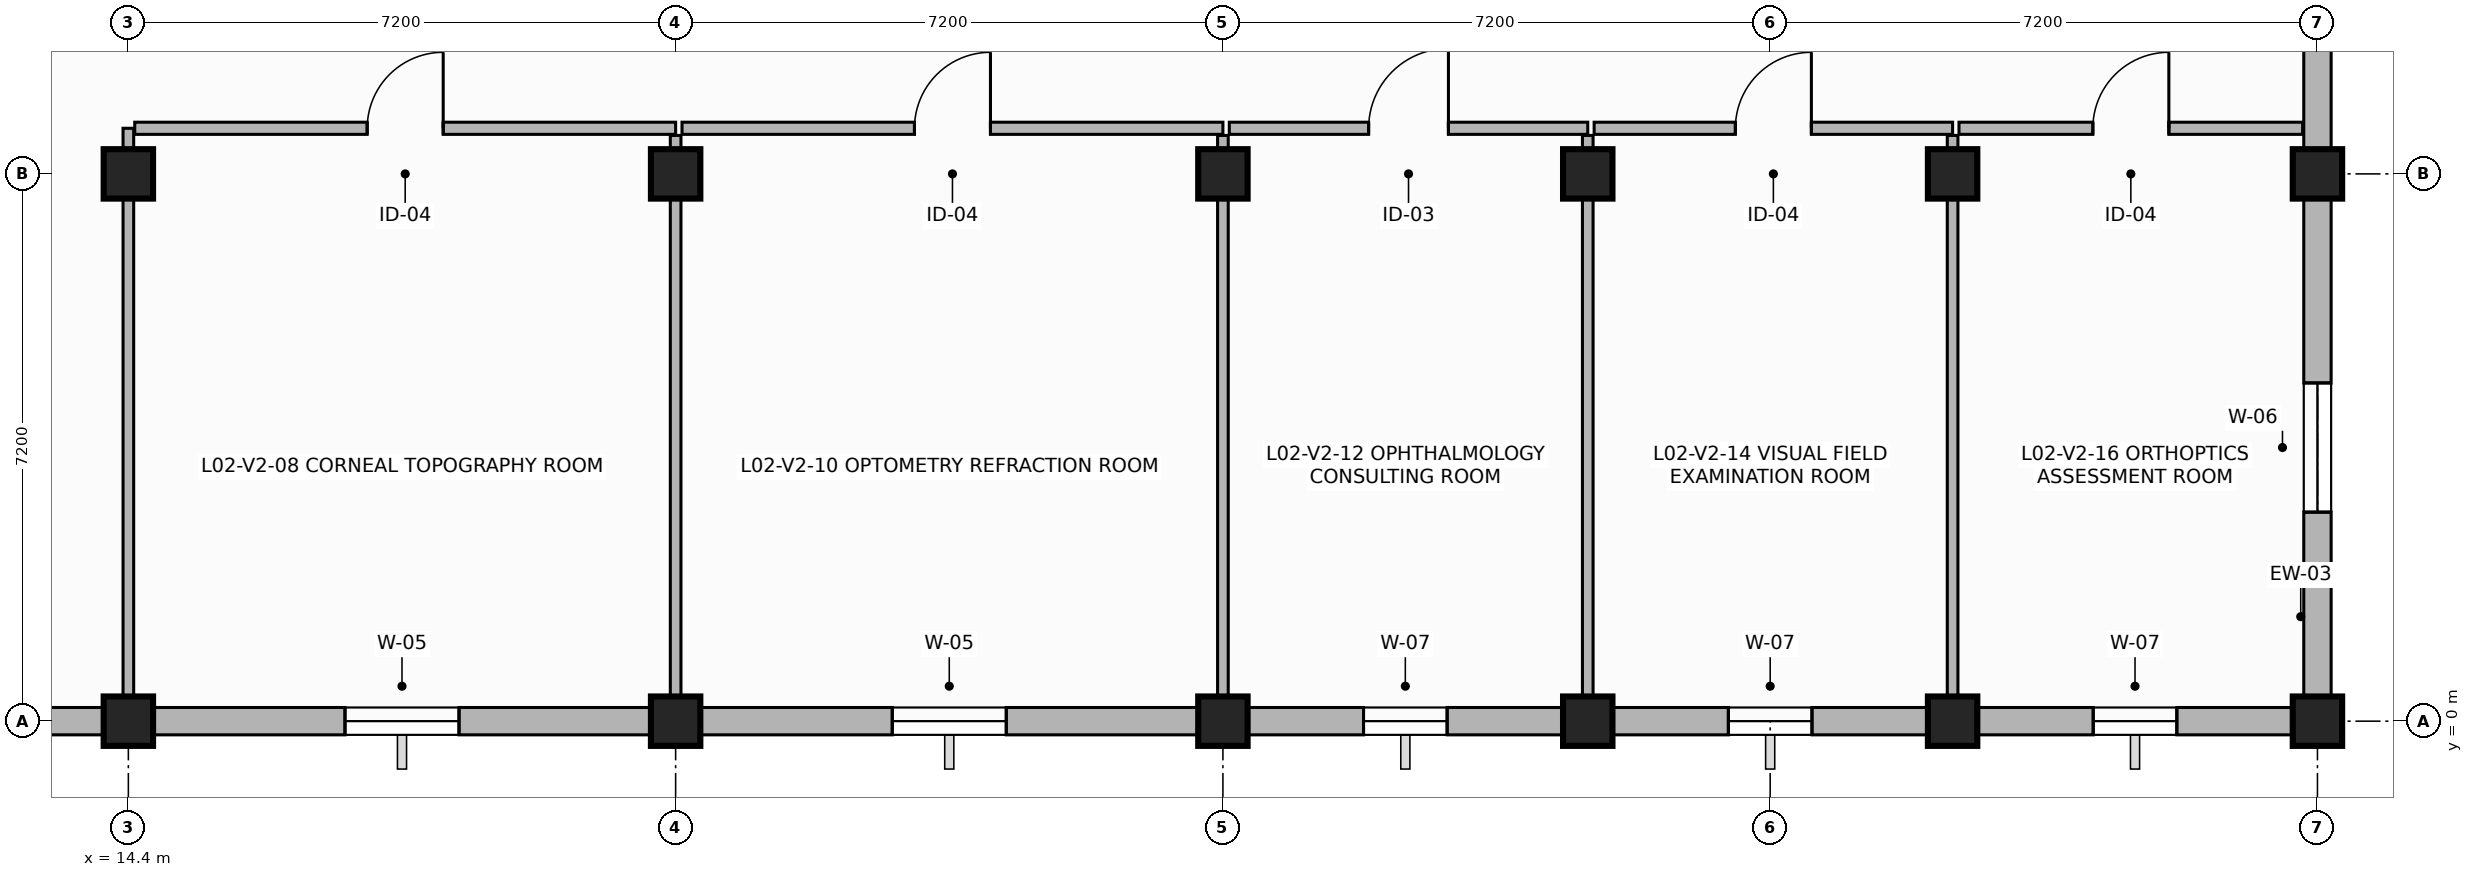
"""IFC4 building model, lengths in metres.
Left out: names, types, materials, properties, quantities, classifications, styles, units other than length and angle.
Written with IfcOpenShell. Run it as: python <this file> out.ifc"""

import sys

from ifc_helpers import new_model, si_unit, direction, frame, frame_2d, origin, origin_2d, place, context, subcontext, project, spatial, rectangle, extrude, element, fill, save


model = new_model("IFC4")
c1 = context("Model", 3, precision=1e-05, world=origin(), true_north=direction((0.0, 1.0)))
c2 = subcontext(c1, "Body", "Model", "MODEL_VIEW")
j1 = project(units=[si_unit("LENGTHUNIT", "METRE"), si_unit("PLANEANGLEUNIT", "RADIAN")], contexts=[c1])
p1 = place(None, origin())
s1 = spatial("IfcSite", under=j1, at=p1, CompositionType="ELEMENT")
p2 = place(p1, origin())
s2 = spatial("IfcBuilding", under=s1, at=p2, CompositionType="ELEMENT")
p3 = place(p2, frame((0.0, 0.0, 8.4)))
s3 = spatial("IfcBuildingStorey", under=s2, at=p3, CompositionType="ELEMENT", Elevation=8.4)
for number, where, z_axis, x_axis in (
    (1, (14.4, 0.0, 0.0), (0.0, 0.0, 1.0), (1.0, 0.0, 0.0)),
    (2, (14.4, 7.2, 0.0), (0.0, 0.0, 1.0), (1.0, 0.0, 0.0)),
    (3, (21.6, 0.0, 0.0), (0.0, 0.0, 1.0), (1.0, 0.0, 0.0)),
    (4, (21.6, 7.2, 0.0), (0.0, 0.0, 1.0), (1.0, 0.0, 0.0)),
    (5, (28.8, 0.0, 0.0), (0.0, 0.0, 1.0), (1.0, 0.0, 0.0)),
    (6, (28.8, 7.2, 0.0), (0.0, 0.0, 1.0), (1.0, 0.0, 0.0)),
    (7, (33.6, 0.0, 0.0), (0.0, 0.0, 1.0), (1.0, 0.0, 0.0)),
    (8, (33.6, 7.2, 0.0), (0.0, 0.0, 1.0), (1.0, 0.0, 0.0)),
    (9, (38.4, 0.0, 0.0), (0.0, 0.0, 1.0), (1.0, 0.0, 0.0)),
    (10, (38.4, 7.2, 0.0), (0.0, 0.0, 1.0), (1.0, 0.0, 0.0)),
    (11, (43.2, 0.0, 0.0), (0.0, 0.0, 1.0), (1.0, 0.0, 0.0)),
    (12, (43.2, 7.2, 0.0), (0.0, 0.0, 1.0), (1.0, 0.0, 0.0)),
):
    element("IfcColumn", number, at=place(p3, frame(where, z_axis=z_axis, x_axis=x_axis)), inside=s3, PredefinedType="COLUMN", context=c2, shape_type="SweptSolid", body=[
        extrude(rectangle(XDim=0.65, YDim=0.65, at=origin_2d()), origin(), (0.0, 0.0, 1.0), 3.62),
    ])
p4 = place(p3, frame((7.2, 0.0, 0.0), z_axis=(0.0, 0.0, 1.0), x_axis=(1.0, 0.0, 0.0)))
e13 = element("IfcWall", 13, at=p4, inside=s3, PredefinedType="SOLIDWALL", context=c2, shape_type="SweptSolid", body=[
    extrude(rectangle(XDim=7.2, YDim=0.36, at=frame_2d((3.6, 0.0))), origin(), (0.0, 0.0, 1.0), 3.0),
])
p5 = place(p4, frame((2.85, 0.0, 0.85)))
e14 = element("IfcOpeningElement", 14, at=p5, cuts=e13, PredefinedType="OPENING", context=c2, shape_type="SweptSolid", body=[
    extrude(rectangle(XDim=1.5, YDim=1.9, at=frame_2d((0.75, 0.95))), frame((0.0, 0.19, 0.0), z_axis=(0.0, -1.0, 0.0), x_axis=(1.0, 0.0, 0.0)), (0.0, 0.0, 1.0), 0.38),
])
p6 = place(p3, frame((14.4, 0.0, 0.0), z_axis=(0.0, 0.0, 1.0), x_axis=(1.0, 0.0, 0.0)))
e15 = element("IfcWall", 15, at=p6, inside=s3, PredefinedType="SOLIDWALL", context=c2, shape_type="SweptSolid", body=[
    extrude(rectangle(XDim=7.2, YDim=0.36, at=frame_2d((3.6, 0.0))), origin(), (0.0, 0.0, 1.0), 3.0),
])
p7 = place(p6, frame((2.85, 0.0, 0.85)))
e16 = element("IfcOpeningElement", 16, at=p7, cuts=e15, PredefinedType="OPENING", context=c2, shape_type="SweptSolid", body=[
    extrude(rectangle(XDim=1.5, YDim=1.9, at=frame_2d((0.75, 0.95))), frame((0.0, 0.19, 0.0), z_axis=(0.0, -1.0, 0.0), x_axis=(1.0, 0.0, 0.0)), (0.0, 0.0, 1.0), 0.38),
])
p8 = place(p3, frame((21.6, 0.0, 0.0), z_axis=(0.0, 0.0, 1.0), x_axis=(1.0, 0.0, 0.0)))
e17 = element("IfcWall", 17, at=p8, inside=s3, PredefinedType="SOLIDWALL", context=c2, shape_type="SweptSolid", body=[
    extrude(rectangle(XDim=7.2, YDim=0.36, at=frame_2d((3.6, 0.0))), origin(), (0.0, 0.0, 1.0), 3.0),
])
p9 = place(p8, frame((2.85, 0.0, 0.85)))
e18 = element("IfcOpeningElement", 18, at=p9, cuts=e17, PredefinedType="OPENING", context=c2, shape_type="SweptSolid", body=[
    extrude(rectangle(XDim=1.5, YDim=1.9, at=frame_2d((0.75, 0.95))), frame((0.0, 0.19, 0.0), z_axis=(0.0, -1.0, 0.0), x_axis=(1.0, 0.0, 0.0)), (0.0, 0.0, 1.0), 0.38),
])
p10 = place(p3, frame((28.8, 0.0, 0.0), z_axis=(0.0, 0.0, 1.0), x_axis=(1.0, 0.0, 0.0)))
e19 = element("IfcWall", 19, at=p10, inside=s3, PredefinedType="SOLIDWALL", context=c2, shape_type="SweptSolid", body=[
    extrude(rectangle(XDim=4.8, YDim=0.36, at=frame_2d((2.4, 0.0))), origin(), (0.0, 0.0, 1.0), 3.0),
])
p11 = place(p10, frame((1.85, 0.0, 0.85)))
e20 = element("IfcOpeningElement", 20, at=p11, cuts=e19, PredefinedType="OPENING", context=c2, shape_type="SweptSolid", body=[
    extrude(rectangle(XDim=1.1, YDim=1.85, at=frame_2d((0.55, 0.925))), frame((0.0, 0.19, 0.0), z_axis=(0.0, -1.0, 0.0), x_axis=(1.0, 0.0, 0.0)), (0.0, 0.0, 1.0), 0.38),
])
p12 = place(p3, frame((33.6, 0.0, 0.0), z_axis=(0.0, 0.0, 1.0), x_axis=(1.0, 0.0, 0.0)))
e21 = element("IfcWall", 21, at=p12, inside=s3, PredefinedType="SOLIDWALL", context=c2, shape_type="SweptSolid", body=[
    extrude(rectangle(XDim=4.8, YDim=0.36, at=frame_2d((2.4, 0.0))), origin(), (0.0, 0.0, 1.0), 3.0),
])
p13 = place(p12, frame((1.85, 0.0, 0.85)))
e22 = element("IfcOpeningElement", 22, at=p13, cuts=e21, PredefinedType="OPENING", context=c2, shape_type="SweptSolid", body=[
    extrude(rectangle(XDim=1.1, YDim=1.85, at=frame_2d((0.55, 0.925))), frame((0.0, 0.19, 0.0), z_axis=(0.0, -1.0, 0.0), x_axis=(1.0, 0.0, 0.0)), (0.0, 0.0, 1.0), 0.38),
])
p14 = place(p3, frame((38.4, 0.0, 0.0), z_axis=(0.0, 0.0, 1.0), x_axis=(1.0, 0.0, 0.0)))
e23 = element("IfcWall", 23, at=p14, inside=s3, PredefinedType="SOLIDWALL", context=c2, shape_type="SweptSolid", body=[
    extrude(rectangle(XDim=4.8, YDim=0.36, at=frame_2d((2.4, 0.0))), origin(), (0.0, 0.0, 1.0), 3.0),
])
p15 = place(p14, frame((1.85, 0.0, 0.85)))
e24 = element("IfcOpeningElement", 24, at=p15, cuts=e23, PredefinedType="OPENING", context=c2, shape_type="SweptSolid", body=[
    extrude(rectangle(XDim=1.1, YDim=1.85, at=frame_2d((0.55, 0.925))), frame((0.0, 0.19, 0.0), z_axis=(0.0, -1.0, 0.0), x_axis=(1.0, 0.0, 0.0)), (0.0, 0.0, 1.0), 0.38),
])
p16 = place(p3, frame((43.2, 0.0, 0.0), z_axis=(0.0, 0.0, 1.0), x_axis=(0.0, 1.0, 0.0)))
e25 = element("IfcWall", 25, at=p16, inside=s3, PredefinedType="SOLIDWALL", context=c2, shape_type="SweptSolid", body=[
    extrude(rectangle(XDim=7.2, YDim=0.36, at=frame_2d((3.6, 0.0))), origin(), (0.0, 0.0, 1.0), 3.0),
])
p17 = place(p16, frame((2.75, 0.0, 0.85)))
e26 = element("IfcOpeningElement", 26, at=p17, cuts=e25, PredefinedType="OPENING", context=c2, shape_type="SweptSolid", body=[
    extrude(rectangle(XDim=1.7, YDim=1.9, at=frame_2d((0.85, 0.95))), frame((0.0, 0.19, 0.0), z_axis=(0.0, -1.0, 0.0), x_axis=(1.0, 0.0, 0.0)), (0.0, 0.0, 1.0), 0.38),
])
p18 = place(p3, frame((43.2, 7.2, 0.0), z_axis=(0.0, 0.0, 1.0), x_axis=(0.0, 1.0, 0.0)))
e27 = element("IfcWall", 27, at=p18, inside=s3, PredefinedType="SOLIDWALL", context=c2, shape_type="SweptSolid", body=[
    extrude(rectangle(XDim=7.2, YDim=0.36, at=frame_2d((3.6, 0.0))), origin(), (0.0, 0.0, 1.0), 3.0),
])
p19 = place(p18, frame((4.35, 0.0, 0.85)))
e28 = element("IfcOpeningElement", 28, at=p19, cuts=e27, PredefinedType="OPENING", context=c2, shape_type="SweptSolid", body=[
    extrude(rectangle(XDim=1.7, YDim=1.9, at=frame_2d((0.85, 0.95))), frame((0.0, 0.19, 0.0), z_axis=(0.0, -1.0, 0.0), x_axis=(1.0, 0.0, 0.0)), (0.0, 0.0, 1.0), 0.38),
])
p20 = place(p3, frame((14.4, 0.195, 0.0), z_axis=(0.0, 0.0, 1.0), x_axis=(0.0, 1.0, 0.0)))
e29 = element("IfcWall", 29, at=p20, inside=s3, PredefinedType="PARTITIONING", context=c2, shape_type="SweptSolid", body=[
    extrude(rectangle(XDim=7.605, YDim=0.14, at=frame_2d((3.802, 0.0))), origin(), (0.0, 0.0, 1.0), 2.98),
])
p21 = place(p3, frame((14.484, 7.8, 0.0), z_axis=(0.0, 0.0, 1.0), x_axis=(1.0, 0.0, 0.0)))
e30 = element("IfcWall", 30, at=p21, inside=s3, PredefinedType="PARTITIONING", context=c2, shape_type="SweptSolid", body=[
    extrude(rectangle(XDim=7.116, YDim=0.16, at=frame_2d((3.558, 0.0))), origin(), (0.0, 0.0, 1.0), 2.98),
])
p22 = place(p21, frame((3.058, 0.0, 0.0)))
e31 = element("IfcOpeningElement", 31, at=p22, cuts=e30, PredefinedType="OPENING", context=c2, shape_type="SweptSolid", body=[
    extrude(rectangle(XDim=1.0, YDim=2.15, at=frame_2d((0.5, 1.075))), frame((0.0, 0.09, 0.0), z_axis=(0.0, -1.0, 0.0), x_axis=(1.0, 0.0, 0.0)), (0.0, 0.0, 1.0), 0.18),
])
p23 = place(p3, frame((21.6, 7.706, 0.0), z_axis=(0.0, 0.0, 1.0), x_axis=(0.0, -1.0, 0.0)))
e32 = element("IfcWall", 32, at=p23, inside=s3, PredefinedType="PARTITIONING", context=c2, shape_type="SweptSolid", body=[
    extrude(rectangle(XDim=7.511, YDim=0.14, at=frame_2d((3.755, 0.0))), origin(), (0.0, 0.0, 1.0), 2.98),
])
p24 = place(p3, frame((21.684, 7.8, 0.0), z_axis=(0.0, 0.0, 1.0), x_axis=(1.0, 0.0, 0.0)))
e33 = element("IfcWall", 33, at=p24, inside=s3, PredefinedType="PARTITIONING", context=c2, shape_type="SweptSolid", body=[
    extrude(rectangle(XDim=7.116, YDim=0.16, at=frame_2d((3.558, 0.0))), origin(), (0.0, 0.0, 1.0), 2.98),
])
p25 = place(p24, frame((3.058, 0.0, 0.0)))
e34 = element("IfcOpeningElement", 34, at=p25, cuts=e33, PredefinedType="OPENING", context=c2, shape_type="SweptSolid", body=[
    extrude(rectangle(XDim=1.0, YDim=2.15, at=frame_2d((0.5, 1.075))), frame((0.0, 0.09, 0.0), z_axis=(0.0, -1.0, 0.0), x_axis=(1.0, 0.0, 0.0)), (0.0, 0.0, 1.0), 0.18),
])
p26 = place(p3, frame((28.8, 7.706, 0.0), z_axis=(0.0, 0.0, 1.0), x_axis=(0.0, -1.0, 0.0)))
e35 = element("IfcWall", 35, at=p26, inside=s3, PredefinedType="PARTITIONING", context=c2, shape_type="SweptSolid", body=[
    extrude(rectangle(XDim=7.511, YDim=0.14, at=frame_2d((3.755, 0.0))), origin(), (0.0, 0.0, 1.0), 2.98),
])
p27 = place(p3, frame((28.884, 7.8, 0.0), z_axis=(0.0, 0.0, 1.0), x_axis=(1.0, 0.0, 0.0)))
e36 = element("IfcWall", 36, at=p27, inside=s3, PredefinedType="PARTITIONING", context=c2, shape_type="SweptSolid", body=[
    extrude(rectangle(XDim=4.716, YDim=0.16, at=frame_2d((2.358, 0.0))), origin(), (0.0, 0.0, 1.0), 2.98),
])
p28 = place(p27, frame((1.833, 0.0, 0.0)))
e37 = element("IfcOpeningElement", 37, at=p28, cuts=e36, PredefinedType="OPENING", context=c2, shape_type="SweptSolid", body=[
    extrude(rectangle(XDim=1.05, YDim=2.15, at=frame_2d((0.525, 1.075))), frame((0.0, 0.09, 0.0), z_axis=(0.0, -1.0, 0.0), x_axis=(1.0, 0.0, 0.0)), (0.0, 0.0, 1.0), 0.18),
])
p29 = place(p3, frame((33.6, 7.706, 0.0), z_axis=(0.0, 0.0, 1.0), x_axis=(0.0, -1.0, 0.0)))
e38 = element("IfcWall", 38, at=p29, inside=s3, PredefinedType="PARTITIONING", context=c2, shape_type="SweptSolid", body=[
    extrude(rectangle(XDim=7.511, YDim=0.14, at=frame_2d((3.755, 0.0))), origin(), (0.0, 0.0, 1.0), 2.98),
])
p30 = place(p3, frame((33.684, 7.8, 0.0), z_axis=(0.0, 0.0, 1.0), x_axis=(1.0, 0.0, 0.0)))
e39 = element("IfcWall", 39, at=p30, inside=s3, PredefinedType="PARTITIONING", context=c2, shape_type="SweptSolid", body=[
    extrude(rectangle(XDim=4.716, YDim=0.16, at=frame_2d((2.358, 0.0))), origin(), (0.0, 0.0, 1.0), 2.98),
])
p31 = place(p30, frame((1.858, 0.0, 0.0)))
e40 = element("IfcOpeningElement", 40, at=p31, cuts=e39, PredefinedType="OPENING", context=c2, shape_type="SweptSolid", body=[
    extrude(rectangle(XDim=1.0, YDim=2.15, at=frame_2d((0.5, 1.075))), frame((0.0, 0.09, 0.0), z_axis=(0.0, -1.0, 0.0), x_axis=(1.0, 0.0, 0.0)), (0.0, 0.0, 1.0), 0.18),
])
p32 = place(p3, frame((38.4, 7.706, 0.0), z_axis=(0.0, 0.0, 1.0), x_axis=(0.0, -1.0, 0.0)))
e41 = element("IfcWall", 41, at=p32, inside=s3, PredefinedType="PARTITIONING", context=c2, shape_type="SweptSolid", body=[
    extrude(rectangle(XDim=7.511, YDim=0.14, at=frame_2d((3.755, 0.0))), origin(), (0.0, 0.0, 1.0), 2.98),
])
p33 = place(p3, frame((38.484, 7.8, 0.0), z_axis=(0.0, 0.0, 1.0), x_axis=(1.0, 0.0, 0.0)))
e42 = element("IfcWall", 42, at=p33, inside=s3, PredefinedType="PARTITIONING", context=c2, shape_type="SweptSolid", body=[
    extrude(rectangle(XDim=4.521, YDim=0.16, at=frame_2d((2.26, 0.0))), origin(), (0.0, 0.0, 1.0), 2.98),
])
p34 = place(p33, frame((1.761, 0.0, 0.0)))
e43 = element("IfcOpeningElement", 43, at=p34, cuts=e42, PredefinedType="OPENING", context=c2, shape_type="SweptSolid", body=[
    extrude(rectangle(XDim=1.0, YDim=2.15, at=frame_2d((0.5, 1.075))), frame((0.0, 0.09, 0.0), z_axis=(0.0, -1.0, 0.0), x_axis=(1.0, 0.0, 0.0)), (0.0, 0.0, 1.0), 0.18),
])
p35 = place(p7, origin())
e44 = element("IfcWindow", 44, at=p35, inside=s3, PartitioningType="SINGLE_PANEL", PredefinedType="WINDOW", context=c2, shape_type="SweptSolid", body=[
    extrude(rectangle(XDim=1.5, YDim=1.9, at=frame_2d((0.75, 0.95))), frame((0.0, 0.03, 0.0), z_axis=(0.0, -1.0, 0.0), x_axis=(1.0, 0.0, 0.0)), (0.0, 0.0, 1.0), 0.06),
])
fill(e16, e44)
p36 = place(p9, origin())
e45 = element("IfcWindow", 45, at=p36, inside=s3, PartitioningType="SINGLE_PANEL", PredefinedType="WINDOW", context=c2, shape_type="SweptSolid", body=[
    extrude(rectangle(XDim=1.5, YDim=1.9, at=frame_2d((0.75, 0.95))), frame((0.0, 0.03, 0.0), z_axis=(0.0, -1.0, 0.0), x_axis=(1.0, 0.0, 0.0)), (0.0, 0.0, 1.0), 0.06),
])
fill(e18, e45)
p37 = place(p11, origin())
e46 = element("IfcWindow", 46, at=p37, inside=s3, PartitioningType="SINGLE_PANEL", PredefinedType="WINDOW", context=c2, shape_type="SweptSolid", body=[
    extrude(rectangle(XDim=1.1, YDim=1.85, at=frame_2d((0.55, 0.925))), frame((0.0, 0.03, 0.0), z_axis=(0.0, -1.0, 0.0), x_axis=(1.0, 0.0, 0.0)), (0.0, 0.0, 1.0), 0.06),
])
fill(e20, e46)
p38 = place(p13, origin())
e47 = element("IfcWindow", 47, at=p38, inside=s3, PartitioningType="SINGLE_PANEL", PredefinedType="WINDOW", context=c2, shape_type="SweptSolid", body=[
    extrude(rectangle(XDim=1.1, YDim=1.85, at=frame_2d((0.55, 0.925))), frame((0.0, 0.03, 0.0), z_axis=(0.0, -1.0, 0.0), x_axis=(1.0, 0.0, 0.0)), (0.0, 0.0, 1.0), 0.06),
])
fill(e22, e47)
p39 = place(p15, origin())
e48 = element("IfcWindow", 48, at=p39, inside=s3, PartitioningType="SINGLE_PANEL", PredefinedType="WINDOW", context=c2, shape_type="SweptSolid", body=[
    extrude(rectangle(XDim=1.1, YDim=1.85, at=frame_2d((0.55, 0.925))), frame((0.0, 0.03, 0.0), z_axis=(0.0, -1.0, 0.0), x_axis=(1.0, 0.0, 0.0)), (0.0, 0.0, 1.0), 0.06),
])
fill(e24, e48)
p40 = place(p17, origin())
e49 = element("IfcWindow", 49, at=p40, inside=s3, PartitioningType="SINGLE_PANEL", PredefinedType="WINDOW", context=c2, shape_type="SweptSolid", body=[
    extrude(rectangle(XDim=1.7, YDim=1.9, at=frame_2d((0.85, 0.95))), frame((0.0, 0.03, 0.0), z_axis=(0.0, -1.0, 0.0), x_axis=(1.0, 0.0, 0.0)), (0.0, 0.0, 1.0), 0.06),
])
fill(e26, e49)
p41 = place(p22, origin())
e50 = element("IfcDoor", 50, at=p41, inside=s3, OperationType="SINGLE_SWING_RIGHT", PredefinedType="DOOR", context=c2, shape_type="SweptSolid", body=[
    extrude(rectangle(XDim=1.0, YDim=2.15, at=frame_2d((0.5, 1.075))), frame((0.0, 0.025, 0.0), z_axis=(0.0, -1.0, 0.0), x_axis=(1.0, 0.0, 0.0)), (0.0, 0.0, 1.0), 0.05),
])
fill(e31, e50)
p42 = place(p25, origin())
e51 = element("IfcDoor", 51, at=p42, inside=s3, OperationType="SINGLE_SWING_RIGHT", PredefinedType="DOOR", context=c2, shape_type="SweptSolid", body=[
    extrude(rectangle(XDim=1.0, YDim=2.15, at=frame_2d((0.5, 1.075))), frame((0.0, 0.025, 0.0), z_axis=(0.0, -1.0, 0.0), x_axis=(1.0, 0.0, 0.0)), (0.0, 0.0, 1.0), 0.05),
])
fill(e34, e51)
p43 = place(p28, origin())
e52 = element("IfcDoor", 52, at=p43, inside=s3, OperationType="SINGLE_SWING_RIGHT", PredefinedType="DOOR", context=c2, shape_type="SweptSolid", body=[
    extrude(rectangle(XDim=1.05, YDim=2.15, at=frame_2d((0.525, 1.075))), frame((0.0, 0.025, 0.0), z_axis=(0.0, -1.0, 0.0), x_axis=(1.0, 0.0, 0.0)), (0.0, 0.0, 1.0), 0.05),
])
fill(e37, e52)
p44 = place(p31, origin())
e53 = element("IfcDoor", 53, at=p44, inside=s3, OperationType="SINGLE_SWING_RIGHT", PredefinedType="DOOR", context=c2, shape_type="SweptSolid", body=[
    extrude(rectangle(XDim=1.0, YDim=2.15, at=frame_2d((0.5, 1.075))), frame((0.0, 0.025, 0.0), z_axis=(0.0, -1.0, 0.0), x_axis=(1.0, 0.0, 0.0)), (0.0, 0.0, 1.0), 0.05),
])
fill(e40, e53)
p45 = place(p34, origin())
e54 = element("IfcDoor", 54, at=p45, inside=s3, OperationType="SINGLE_SWING_RIGHT", PredefinedType="DOOR", context=c2, shape_type="SweptSolid", body=[
    extrude(rectangle(XDim=1.0, YDim=2.15, at=frame_2d((0.5, 1.075))), frame((0.0, 0.025, 0.0), z_axis=(0.0, -1.0, 0.0), x_axis=(1.0, 0.0, 0.0)), (0.0, 0.0, 1.0), 0.05),
])
fill(e43, e54)
save(model, sys.argv[1])
